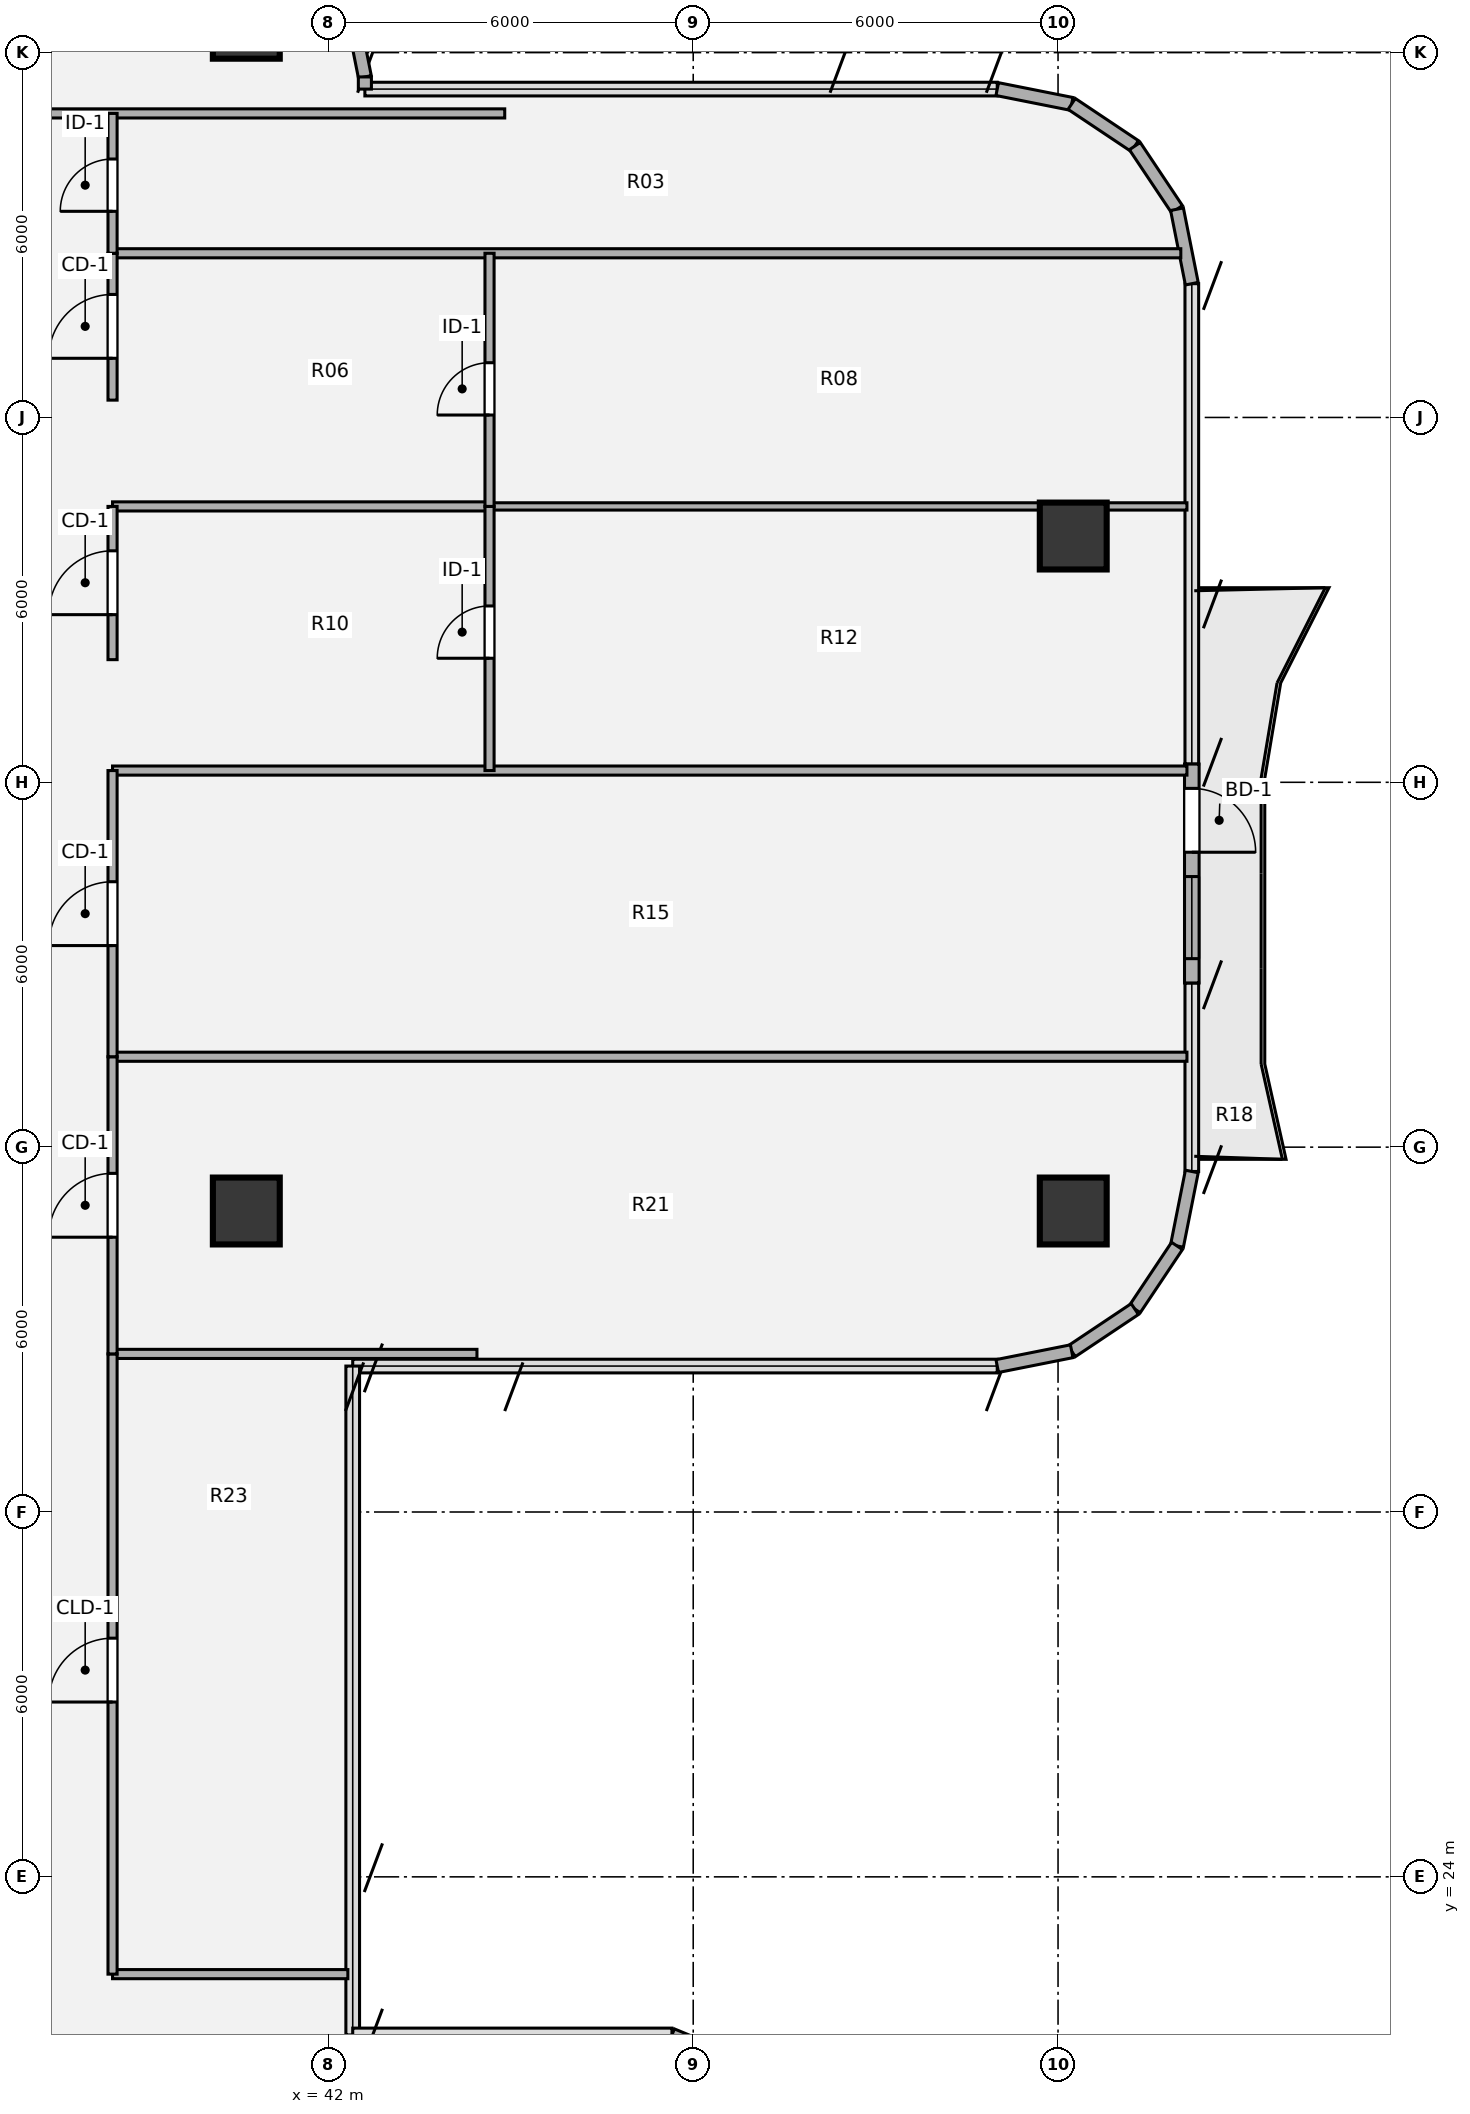
"""IFC4 building model, lengths in metres.
Left out: names, types, materials, properties, quantities, classifications, styles, units other than length and angle.
Written with IfcOpenShell. Run it as: python <this file> out.ifc"""

import sys

from ifc_helpers import new_model, si_unit, direction, frame, frame_2d, origin, origin_2d, place, context, subcontext, project, spatial, rectangle, hollow_circle, extrude, source, transform, mapped, element, fill, save


model = new_model("IFC4")
c1 = context("Model", 3, precision=1e-05, world=origin(), true_north=direction((0.0, 1.0)))
c2 = subcontext(c1, "Body", "Model", "MODEL_VIEW")
j1 = project(units=[si_unit("LENGTHUNIT", "METRE"), si_unit("PLANEANGLEUNIT", "RADIAN")], contexts=[c1])
p1 = place(None, origin())
s1 = spatial("IfcSite", under=j1, at=p1, CompositionType="ELEMENT")
p2 = place(p1, origin())
s2 = spatial("IfcBuilding", under=s1, at=p2, CompositionType="ELEMENT")
p3 = place(p2, frame((0.0, 0.0, 194.22)))
s3 = spatial("IfcBuildingStorey", under=s2, at=p3, CompositionType="ELEMENT", Elevation=194.22)
m1 = source(origin(), c2, "Body", "SweptSolid", [
    extrude(hollow_circle(Radius=0.55, WallThickness=0.04, at=origin_2d()), origin(), (0.0, 0.0, 1.0), 3.78),
])
for number, where, z_axis, x_axis in (
    (1, (54.25, 34.95, 0.0), (0.0, 0.0, 1.0), (1.0, 0.0, 0.0)),
    (2, (54.25, 46.05, 0.0), (0.0, 0.0, 1.0), (1.0, 0.0, 0.0)),
    (3, (40.65, 34.95, 0.0), (0.0, 0.0, 1.0), (1.0, 0.0, 0.0)),
    (4, (40.65, 54.45, 0.0), (0.0, 0.0, 1.0), (1.0, 0.0, 0.0)),
):
    element("IfcColumn", number, at=place(p3, frame(where, z_axis=z_axis, x_axis=x_axis)), inside=s3, PredefinedType="COLUMN", context=c2, shape_type="MappedRepresentation", body=[
        mapped(m1, transform((0.0, 0.0, 0.0), x_axis=(1.0, 0.0, 0.0), y_axis=(0.0, 1.0, 0.0), z_axis=(0.0, 0.0, 1.0), scale=1.0)),
    ])
p4 = place(p3, frame((42.387, 54.671, 0.0), z_axis=(0.0, 0.0, 1.0), x_axis=(0.195127417394, -0.980777900945, 0.0)))
e5 = element("IfcWall", 5, at=p4, inside=s3, PredefinedType="SOLIDWALL", context=c2, shape_type="SweptSolid", body=[
    extrude(rectangle(XDim=1.092, YDim=0.215, at=frame_2d((0.546, 0.0))), origin(), (0.0, 0.0, 1.0), 3.53),
])
p5 = place(p3, frame((42.6, 53.6, 0.0), z_axis=(0.0, 0.0, 1.0), x_axis=(0.0, -1.0, 0.0)))
e6 = element("IfcWall", 6, at=p5, inside=s3, PredefinedType="SOLIDWALL", context=c2, shape_type="SweptSolid", body=[
    extrude(rectangle(XDim=0.2, YDim=0.215, at=frame_2d((0.1, 0.0))), origin(), (0.0, 0.0, 1.0), 3.53),
])
for number, where, z_axis, x_axis in (
    (7, (53.0, 53.4, 0.0), (0.0, 0.0, 1.0), (0.981, -0.195, 0.0)),
    (8, (54.225, 53.156, 0.0), (0.0, 0.0, 1.0), (0.831, -0.556, 0.0)),
    (9, (55.263, 52.463, 0.0), (0.0, 0.0, 1.0), (0.556, -0.831, 0.0)),
    (10, (55.956, 51.425, 0.0), (0.0, 0.0, 1.0), (0.195, -0.981, 0.0)),
):
    element("IfcWall", number, at=place(p3, frame(where, z_axis=z_axis, x_axis=x_axis)), inside=s3, PredefinedType="SOLIDWALL", context=c2, shape_type="SweptSolid", body=[
        extrude(rectangle(XDim=1.249, YDim=0.215, at=frame_2d((0.624, 0.0))), origin(), (0.0, 0.0, 1.0), 3.53),
    ])
p6 = place(p3, frame((56.2, 42.3, 0.0), z_axis=(0.0, 0.0, 1.0), x_axis=(0.0, -1.0, 0.0)))
e11 = element("IfcWall", 11, at=p6, inside=s3, PredefinedType="SOLIDWALL", context=c2, shape_type="SweptSolid", body=[
    extrude(rectangle(XDim=3.6, YDim=0.24, at=frame_2d((1.8, 0.0))), origin(), (0.0, 0.0, 1.0), 3.53),
])
p7 = place(p6, frame((0.4, 0.0, 0.0)))
e12 = element("IfcOpeningElement", 12, at=p7, cuts=e11, PredefinedType="OPENING", context=c2, shape_type="SweptSolid", body=[
    extrude(rectangle(XDim=1.05, YDim=2.15, at=origin_2d()), frame((0.525, 0.13, 1.075), z_axis=(0.0, -1.0, 0.0), x_axis=(1.0, 0.0, 0.0)), (0.0, 0.0, 1.0), 0.26),
])
p8 = place(p6, frame((1.85, 0.0, 0.85)))
e13 = element("IfcOpeningElement", 13, at=p8, cuts=e11, PredefinedType="OPENING", context=c2, shape_type="SweptSolid", body=[
    extrude(rectangle(XDim=1.35, YDim=1.35, at=origin_2d()), frame((0.675, 0.13, 0.675), z_axis=(0.0, -1.0, 0.0), x_axis=(1.0, 0.0, 0.0)), (0.0, 0.0, 1.0), 0.26),
])
for number, where, z_axis, x_axis in (
    (14, (56.2, 35.6, 0.0), (0.0, 0.0, 1.0), (-0.195, -0.981, 0.0)),
    (15, (55.956, 34.375, 0.0), (0.0, 0.0, 1.0), (-0.556, -0.831, 0.0)),
    (16, (55.263, 33.337, 0.0), (0.0, 0.0, 1.0), (-0.831, -0.556, 0.0)),
    (17, (54.225, 32.644, 0.0), (0.0, 0.0, 1.0), (-0.981, -0.195, 0.0)),
):
    element("IfcWall", number, at=place(p3, frame(where, z_axis=z_axis, x_axis=x_axis)), inside=s3, PredefinedType="SOLIDWALL", context=c2, shape_type="SweptSolid", body=[
        extrude(rectangle(XDim=1.249, YDim=0.215, at=frame_2d((0.624, 0.0))), origin(), (0.0, 0.0, 1.0), 3.53),
    ])
p9 = place(p3, frame((47.65, 21.4, 0.0), z_axis=(0.0, 0.0, 1.0), x_axis=(0.924205486139, -0.381895560841, 0.0)))
e18 = element("IfcWall", 18, at=p9, inside=s3, PredefinedType="SOLIDWALL", context=c2, shape_type="SweptSolid", body=[
    extrude(rectangle(XDim=0.268, YDim=0.215, at=frame_2d((0.134, 0.0))), origin(), (0.0, 0.0, 1.0), 3.53),
])
p10 = place(p3, frame((38.45, 22.4, 0.0), z_axis=(0.0, 0.0, 1.0), x_axis=(1.0, 0.0, 0.0)))
e19 = element("IfcWall", 19, at=p10, inside=s3, PredefinedType="PARTITIONING", context=c2, shape_type="SweptSolid", body=[
    extrude(rectangle(XDim=3.87, YDim=0.15, at=frame_2d((1.935, 0.0))), origin(), (0.0, 0.0, 1.0), 3.5),
])
p11 = place(p3, frame((38.45, 32.6, 0.0), z_axis=(0.0, 0.0, 1.0), x_axis=(1.0, 0.0, 0.0)))
e20 = element("IfcWall", 20, at=p11, inside=s3, PredefinedType="PARTITIONING", context=c2, shape_type="SweptSolid", body=[
    extrude(rectangle(XDim=5.993, YDim=0.15, at=frame_2d((2.997, 0.0))), origin(), (0.0, 0.0, 1.0), 3.5),
])
p12 = place(p3, frame((38.45, 37.487, 0.0), z_axis=(0.0, 0.0, 1.0), x_axis=(1.0, 0.0, 0.0)))
e21 = element("IfcWall", 21, at=p12, inside=s3, PredefinedType="PARTITIONING", context=c2, shape_type="SweptSolid", body=[
    extrude(rectangle(XDim=17.67, YDim=0.15, at=frame_2d((8.835, 0.0))), origin(), (0.0, 0.0, 1.0), 3.055),
])
p13 = place(p3, frame((38.45, 42.193, 0.0), z_axis=(0.0, 0.0, 1.0), x_axis=(1.0, 0.0, 0.0)))
e22 = element("IfcWall", 22, at=p13, inside=s3, PredefinedType="PARTITIONING", context=c2, shape_type="SweptSolid", body=[
    extrude(rectangle(XDim=17.67, YDim=0.15, at=frame_2d((8.835, 0.0))), origin(), (0.0, 0.0, 1.0), 2.982),
])
p14 = place(p3, frame((38.45, 46.537, 0.0), z_axis=(0.0, 0.0, 1.0), x_axis=(1.0, 0.0, 0.0)))
e23 = element("IfcWall", 23, at=p14, inside=s3, PredefinedType="PARTITIONING", context=c2, shape_type="SweptSolid", body=[
    extrude(rectangle(XDim=6.2, YDim=0.15, at=frame_2d((3.1, 0.0))), origin(), (0.0, 0.0, 1.0), 3.259),
])
p15 = place(p3, frame((44.65, 46.537, 0.0), z_axis=(0.0, 0.0, 1.0), x_axis=(1.0, 0.0, 0.0)))
e24 = element("IfcWall", 24, at=p15, inside=s3, PredefinedType="PARTITIONING", context=c2, shape_type="SweptSolid", body=[
    extrude(rectangle(XDim=11.47, YDim=0.12, at=frame_2d((5.735, 0.0))), origin(), (0.0, 0.0, 1.0), 3.5),
])
p16 = place(p3, frame((38.45, 50.7, 0.0), z_axis=(0.0, 0.0, 1.0), x_axis=(1.0, 0.0, 0.0)))
e25 = element("IfcWall", 25, at=p16, inside=s3, PredefinedType="PARTITIONING", context=c2, shape_type="SweptSolid", body=[
    extrude(rectangle(XDim=17.569, YDim=0.15, at=frame_2d((8.785, 0.0))), origin(), (0.0, 0.0, 1.0), 3.308),
])
p17 = place(p3, frame((27.1, 53.0, 0.0), z_axis=(0.0, 0.0, 1.0), x_axis=(1.0, 0.0, 0.0)))
e26 = element("IfcWall", 26, at=p17, inside=s3, PredefinedType="PARTITIONING", context=c2, shape_type="SweptSolid", body=[
    extrude(rectangle(XDim=17.8, YDim=0.15, at=frame_2d((8.9, 0.0))), origin(), (0.0, 0.0, 1.0), 3.308),
])
p18 = place(p17, frame((8.375, 0.0, 0.0)))
e27 = element("IfcOpeningElement", 27, at=p18, cuts=e26, PredefinedType="OPENING", context=c2, shape_type="SweptSolid", body=[
    extrude(rectangle(XDim=1.05, YDim=2.1, at=origin_2d()), frame((0.525, 0.085, 1.05), z_axis=(0.0, -1.0, 0.0), x_axis=(1.0, 0.0, 0.0)), (0.0, 0.0, 1.0), 0.17),
])
p19 = place(p3, frame((38.45, 22.4, 0.0), z_axis=(0.0, 0.0, 1.0), x_axis=(0.0, 1.0, 0.0)))
e28 = element("IfcWall", 28, at=p19, inside=s3, PredefinedType="PARTITIONING", context=c2, shape_type="SweptSolid", body=[
    extrude(rectangle(XDim=10.2, YDim=0.15, at=frame_2d((5.1, 0.0))), origin(), (0.0, 0.0, 1.0), 3.5),
])
p20 = place(p19, frame((4.475, 0.0, 0.0)))
e29 = element("IfcOpeningElement", 29, at=p20, cuts=e28, PredefinedType="OPENING", context=c2, shape_type="SweptSolid", body=[
    extrude(rectangle(XDim=1.05, YDim=2.1, at=origin_2d()), frame((0.525, 0.085, 1.05), z_axis=(0.0, -1.0, 0.0), x_axis=(1.0, 0.0, 0.0)), (0.0, 0.0, 1.0), 0.17),
])
p21 = place(p3, frame((38.45, 32.6, 0.0), z_axis=(0.0, 0.0, 1.0), x_axis=(0.0, 1.0, 0.0)))
e30 = element("IfcWall", 30, at=p21, inside=s3, PredefinedType="PARTITIONING", context=c2, shape_type="SweptSolid", body=[
    extrude(rectangle(XDim=4.887, YDim=0.15, at=frame_2d((2.443, 0.0))), origin(), (0.0, 0.0, 1.0), 3.5),
])
p22 = place(p21, frame((1.919, 0.0, 0.0)))
e31 = element("IfcOpeningElement", 31, at=p22, cuts=e30, PredefinedType="OPENING", context=c2, shape_type="SweptSolid", body=[
    extrude(rectangle(XDim=1.05, YDim=2.1, at=origin_2d()), frame((0.525, 0.085, 1.05), z_axis=(0.0, -1.0, 0.0), x_axis=(1.0, 0.0, 0.0)), (0.0, 0.0, 1.0), 0.17),
])
p23 = place(p3, frame((38.45, 37.487, 0.0), z_axis=(0.0, 0.0, 1.0), x_axis=(0.0, 1.0, 0.0)))
e32 = element("IfcWall", 32, at=p23, inside=s3, PredefinedType="PARTITIONING", context=c2, shape_type="SweptSolid", body=[
    extrude(rectangle(XDim=4.706, YDim=0.15, at=frame_2d((2.353, 0.0))), origin(), (0.0, 0.0, 1.0), 3.5),
])
p24 = place(p23, frame((1.828, 0.0, 0.0)))
e33 = element("IfcOpeningElement", 33, at=p24, cuts=e32, PredefinedType="OPENING", context=c2, shape_type="SweptSolid", body=[
    extrude(rectangle(XDim=1.05, YDim=2.1, at=origin_2d()), frame((0.525, 0.085, 1.05), z_axis=(0.0, -1.0, 0.0), x_axis=(1.0, 0.0, 0.0)), (0.0, 0.0, 1.0), 0.17),
])
p25 = place(p3, frame((38.45, 44.017, 0.0), z_axis=(0.0, 0.0, 1.0), x_axis=(0.0, 1.0, 0.0)))
e34 = element("IfcWall", 34, at=p25, inside=s3, PredefinedType="PARTITIONING", context=c2, shape_type="SweptSolid", body=[
    extrude(rectangle(XDim=2.52, YDim=0.15, at=frame_2d((1.26, 0.0))), origin(), (0.0, 0.0, 1.0), 3.5),
])
p26 = place(p25, frame((0.74, 0.0, 0.0)))
e35 = element("IfcOpeningElement", 35, at=p26, cuts=e34, PredefinedType="OPENING", context=c2, shape_type="SweptSolid", body=[
    extrude(rectangle(XDim=1.05, YDim=2.1, at=origin_2d()), frame((0.525, 0.085, 1.05), z_axis=(0.0, -1.0, 0.0), x_axis=(1.0, 0.0, 0.0)), (0.0, 0.0, 1.0), 0.17),
])
p27 = place(p3, frame((38.45, 48.285, 0.0), z_axis=(0.0, 0.0, 1.0), x_axis=(0.0, 1.0, 0.0)))
e36 = element("IfcWall", 36, at=p27, inside=s3, PredefinedType="PARTITIONING", context=c2, shape_type="SweptSolid", body=[
    extrude(rectangle(XDim=2.415, YDim=0.15, at=frame_2d((1.208, 0.0))), origin(), (0.0, 0.0, 1.0), 3.5),
])
p28 = place(p27, frame((0.688, 0.0, 0.0)))
e37 = element("IfcOpeningElement", 37, at=p28, cuts=e36, PredefinedType="OPENING", context=c2, shape_type="SweptSolid", body=[
    extrude(rectangle(XDim=1.05, YDim=2.1, at=origin_2d()), frame((0.525, 0.085, 1.05), z_axis=(0.0, -1.0, 0.0), x_axis=(1.0, 0.0, 0.0)), (0.0, 0.0, 1.0), 0.17),
])
p29 = place(p3, frame((38.45, 50.7, 0.0), z_axis=(0.0, 0.0, 1.0), x_axis=(0.0, 1.0, 0.0)))
e38 = element("IfcWall", 38, at=p29, inside=s3, PredefinedType="PARTITIONING", context=c2, shape_type="SweptSolid", body=[
    extrude(rectangle(XDim=2.3, YDim=0.15, at=frame_2d((1.15, 0.0))), origin(), (0.0, 0.0, 1.0), 3.5),
])
p30 = place(p29, frame((0.69, 0.0, 0.0)))
e39 = element("IfcOpeningElement", 39, at=p30, cuts=e38, PredefinedType="OPENING", context=c2, shape_type="SweptSolid", body=[
    extrude(rectangle(XDim=0.86, YDim=2.1, at=origin_2d()), frame((0.43, 0.085, 1.05), z_axis=(0.0, -1.0, 0.0), x_axis=(1.0, 0.0, 0.0)), (0.0, 0.0, 1.0), 0.17),
])
p31 = place(p3, frame((44.65, 42.193, 0.0), z_axis=(0.0, 0.0, 1.0), x_axis=(0.0, 1.0, 0.0)))
e40 = element("IfcWall", 40, at=p31, inside=s3, PredefinedType="PARTITIONING", context=c2, shape_type="SweptSolid", body=[
    extrude(rectangle(XDim=4.344, YDim=0.15, at=frame_2d((2.172, 0.0))), origin(), (0.0, 0.0, 1.0), 3.5),
])
p32 = place(p31, frame((1.847, 0.0, 0.0)))
e41 = element("IfcOpeningElement", 41, at=p32, cuts=e40, PredefinedType="OPENING", context=c2, shape_type="SweptSolid", body=[
    extrude(rectangle(XDim=0.86, YDim=2.1, at=origin_2d()), frame((0.43, 0.085, 1.05), z_axis=(0.0, -1.0, 0.0), x_axis=(1.0, 0.0, 0.0)), (0.0, 0.0, 1.0), 0.17),
])
p33 = place(p3, frame((44.65, 46.537, 0.0), z_axis=(0.0, 0.0, 1.0), x_axis=(0.0, 1.0, 0.0)))
e42 = element("IfcWall", 42, at=p33, inside=s3, PredefinedType="PARTITIONING", context=c2, shape_type="SweptSolid", body=[
    extrude(rectangle(XDim=4.163, YDim=0.15, at=frame_2d((2.082, 0.0))), origin(), (0.0, 0.0, 1.0), 3.5),
])
p34 = place(p33, frame((1.503, 0.0, 0.0)))
e43 = element("IfcOpeningElement", 43, at=p34, cuts=e42, PredefinedType="OPENING", context=c2, shape_type="SweptSolid", body=[
    extrude(rectangle(XDim=0.86, YDim=2.1, at=origin_2d()), frame((0.43, 0.085, 1.05), z_axis=(0.0, -1.0, 0.0), x_axis=(1.0, 0.0, 0.0)), (0.0, 0.0, 1.0), 0.17),
])
m2 = source(origin(), c2, "Body", "SweptSolid", [
    extrude(rectangle(XDim=1.05, YDim=2.15, at=origin_2d()), frame((0.525, 0.025, 1.075), z_axis=(0.0, -1.0, 0.0), x_axis=(1.0, 0.0, 0.0)), (0.0, 0.0, 1.0), 0.05),
])
p35 = place(p7, origin())
e44 = element("IfcDoor", 44, at=p35, inside=s3, OperationType="SINGLE_SWING_RIGHT", PredefinedType="DOOR", context=c2, shape_type="MappedRepresentation", body=[
    mapped(m2, transform((0.0, 0.0, 0.0), x_axis=(1.0, 0.0, 0.0), y_axis=(0.0, 1.0, 0.0), z_axis=(0.0, 0.0, 1.0), scale=1.0)),
])
fill(e12, e44)
m3 = source(origin(), c2, "Body", "SweptSolid", [
    extrude(rectangle(XDim=1.35, YDim=1.35, at=origin_2d()), frame((0.675, 0.03, 0.675), z_axis=(0.0, -1.0, 0.0), x_axis=(1.0, 0.0, 0.0)), (0.0, 0.0, 1.0), 0.06),
])
p36 = place(p8, origin())
e45 = element("IfcWindow", 45, at=p36, inside=s3, PartitioningType="SINGLE_PANEL", PredefinedType="WINDOW", context=c2, shape_type="MappedRepresentation", body=[
    mapped(m3, transform((0.0, 0.0, 0.0), x_axis=(1.0, 0.0, 0.0), y_axis=(0.0, 1.0, 0.0), z_axis=(0.0, 0.0, 1.0), scale=1.0)),
])
fill(e13, e45)
m4 = source(origin(), c2, "Body", "SweptSolid", [
    extrude(rectangle(XDim=1.05, YDim=2.1, at=origin_2d()), frame((0.525, 0.025, 1.05), z_axis=(0.0, -1.0, 0.0), x_axis=(1.0, 0.0, 0.0)), (0.0, 0.0, 1.0), 0.05),
])
p37 = place(p20, origin())
e46 = element("IfcDoor", 46, at=p37, inside=s3, OperationType="SINGLE_SWING_LEFT", PredefinedType="DOOR", context=c2, shape_type="MappedRepresentation", body=[
    mapped(m4, transform((0.0, 0.0, 0.0), x_axis=(1.0, 0.0, 0.0), y_axis=(0.0, 1.0, 0.0), z_axis=(0.0, 0.0, 1.0), scale=1.0)),
])
fill(e29, e46)
m5 = source(origin(), c2, "Body", "SweptSolid", [
    extrude(rectangle(XDim=1.05, YDim=2.1, at=origin_2d()), frame((0.525, 0.025, 1.05), z_axis=(0.0, -1.0, 0.0), x_axis=(1.0, 0.0, 0.0)), (0.0, 0.0, 1.0), 0.05),
])
p38 = place(p22, origin())
e47 = element("IfcDoor", 47, at=p38, inside=s3, OperationType="SINGLE_SWING_LEFT", PredefinedType="DOOR", context=c2, shape_type="MappedRepresentation", body=[
    mapped(m5, transform((0.0, 0.0, 0.0), x_axis=(1.0, 0.0, 0.0), y_axis=(0.0, 1.0, 0.0), z_axis=(0.0, 0.0, 1.0), scale=1.0)),
])
fill(e31, e47)
p39 = place(p24, origin())
e48 = element("IfcDoor", 48, at=p39, inside=s3, OperationType="SINGLE_SWING_LEFT", PredefinedType="DOOR", context=c2, shape_type="MappedRepresentation", body=[
    mapped(m5, transform((0.0, 0.0, 0.0), x_axis=(1.0, 0.0, 0.0), y_axis=(0.0, 1.0, 0.0), z_axis=(0.0, 0.0, 1.0), scale=1.0)),
])
fill(e33, e48)
p40 = place(p26, origin())
e49 = element("IfcDoor", 49, at=p40, inside=s3, OperationType="SINGLE_SWING_LEFT", PredefinedType="DOOR", context=c2, shape_type="MappedRepresentation", body=[
    mapped(m5, transform((0.0, 0.0, 0.0), x_axis=(1.0, 0.0, 0.0), y_axis=(0.0, 1.0, 0.0), z_axis=(0.0, 0.0, 1.0), scale=1.0)),
])
fill(e35, e49)
p41 = place(p28, origin())
e50 = element("IfcDoor", 50, at=p41, inside=s3, OperationType="SINGLE_SWING_LEFT", PredefinedType="DOOR", context=c2, shape_type="MappedRepresentation", body=[
    mapped(m5, transform((0.0, 0.0, 0.0), x_axis=(1.0, 0.0, 0.0), y_axis=(0.0, 1.0, 0.0), z_axis=(0.0, 0.0, 1.0), scale=1.0)),
])
fill(e37, e50)
m6 = source(origin(), c2, "Body", "SweptSolid", [
    extrude(rectangle(XDim=0.86, YDim=2.1, at=origin_2d()), frame((0.43, 0.025, 1.05), z_axis=(0.0, -1.0, 0.0), x_axis=(1.0, 0.0, 0.0)), (0.0, 0.0, 1.0), 0.05),
])
p42 = place(p30, origin())
e51 = element("IfcDoor", 51, at=p42, inside=s3, OperationType="SINGLE_SWING_LEFT", PredefinedType="DOOR", context=c2, shape_type="MappedRepresentation", body=[
    mapped(m6, transform((0.0, 0.0, 0.0), x_axis=(1.0, 0.0, 0.0), y_axis=(0.0, 1.0, 0.0), z_axis=(0.0, 0.0, 1.0), scale=1.0)),
])
fill(e39, e51)
p43 = place(p32, origin())
e52 = element("IfcDoor", 52, at=p43, inside=s3, OperationType="SINGLE_SWING_LEFT", PredefinedType="DOOR", context=c2, shape_type="MappedRepresentation", body=[
    mapped(m6, transform((0.0, 0.0, 0.0), x_axis=(1.0, 0.0, 0.0), y_axis=(0.0, 1.0, 0.0), z_axis=(0.0, 0.0, 1.0), scale=1.0)),
])
fill(e41, e52)
p44 = place(p34, origin())
e53 = element("IfcDoor", 53, at=p44, inside=s3, OperationType="SINGLE_SWING_LEFT", PredefinedType="DOOR", context=c2, shape_type="MappedRepresentation", body=[
    mapped(m6, transform((0.0, 0.0, 0.0), x_axis=(1.0, 0.0, 0.0), y_axis=(0.0, 1.0, 0.0), z_axis=(0.0, 0.0, 1.0), scale=1.0)),
])
fill(e43, e53)
save(model, sys.argv[1])
